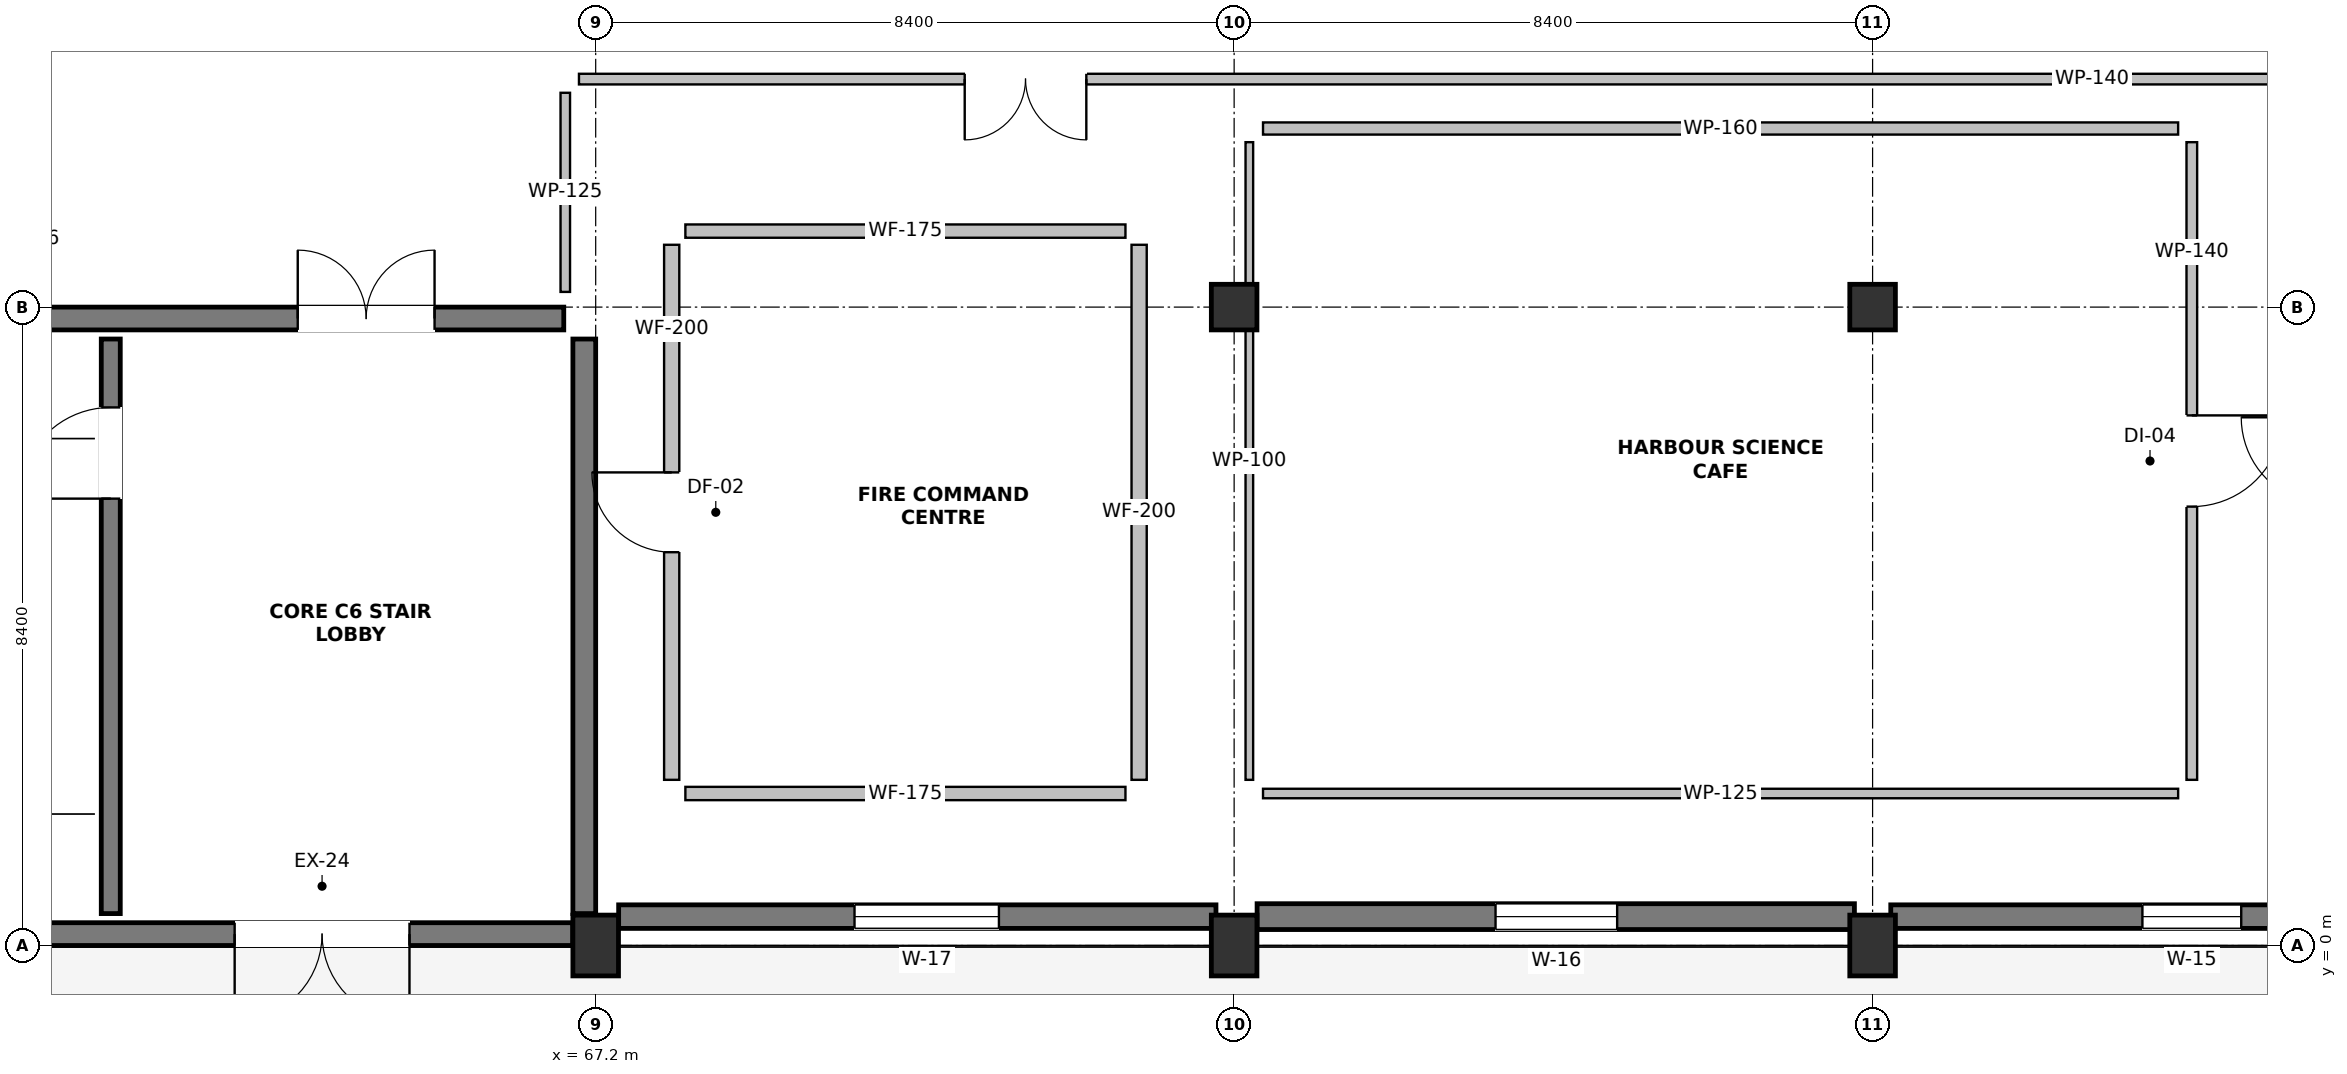
"""IFC4 building model, lengths in metres.
Left out: names, types, materials, properties, quantities, classifications, styles, units other than length and angle.
Written with IfcOpenShell. Run it as: python <this file> out.ifc"""

import sys

from ifc_helpers import new_model, si_unit, direction, frame, frame_2d, origin, origin_2d, place, context, subcontext, project, spatial, rectangle, extrude, element, fill, save


model = new_model("IFC4")
c1 = context("Model", 3, precision=1e-05, world=origin(), true_north=direction((0.0, 1.0)))
c2 = subcontext(c1, "Body", "Model", "MODEL_VIEW")
j1 = project(units=[si_unit("LENGTHUNIT", "METRE"), si_unit("PLANEANGLEUNIT", "RADIAN")], contexts=[c1])
p1 = place(None, origin())
s1 = spatial("IfcSite", under=j1, at=p1, CompositionType="ELEMENT")
p2 = place(p1, origin())
s2 = spatial("IfcBuilding", under=s1, at=p2, CompositionType="ELEMENT")
p3 = place(p2, origin())
s3 = spatial("IfcBuildingStorey", under=s2, at=p3, CompositionType="ELEMENT", Elevation=0.0)
for number, where, z_axis, x_axis in (
    (1, (67.2, 0.0, 0.0), (0.0, 0.0, 1.0), (1.0, 0.0, 0.0)),
    (2, (75.6, 0.0, 0.0), (0.0, 0.0, 1.0), (1.0, 0.0, 0.0)),
    (3, (84.0, 0.0, 0.0), (0.0, 0.0, 1.0), (1.0, 0.0, 0.0)),
):
    element("IfcColumn", number, at=place(p3, frame(where, z_axis=z_axis, x_axis=x_axis)), inside=s3, PredefinedType="COLUMN", context=c2, shape_type="SweptSolid", body=[
        extrude(rectangle(XDim=0.6, YDim=0.8, at=origin_2d()), origin(), (0.0, 0.0, 1.0), 5.1),
    ])
for number, where, z_axis, x_axis in (
    (4, (75.6, 8.4, 0.0), (0.0, 0.0, 1.0), (1.0, 0.0, 0.0)),
    (5, (84.0, 8.4, 0.0), (0.0, 0.0, 1.0), (1.0, 0.0, 0.0)),
):
    element("IfcColumn", number, at=place(p3, frame(where, z_axis=z_axis, x_axis=x_axis)), inside=s3, PredefinedType="COLUMN", context=c2, shape_type="SweptSolid", body=[
        extrude(rectangle(XDim=0.6, YDim=0.6, at=origin_2d()), origin(), (0.0, 0.0, 1.0), 5.1),
    ])
p4 = place(p3, frame((92.161, 0.38, 0.0), z_axis=(0.0, 0.0, 1.0), x_axis=(-1.0, 0.0, 0.0)))
e6 = element("IfcWall", 6, at=p4, inside=s3, PredefinedType="SOLIDWALL", context=c2, shape_type="SweptSolid", body=[
    extrude(rectangle(XDim=7.922, YDim=0.31, at=frame_2d((3.961, 0.0))), origin(), (0.0, 0.0, 1.0), 4.05),
])
p5 = place(p4, frame((3.311, 0.0, 0.85)))
e7 = element("IfcOpeningElement", 7, at=p5, cuts=e6, PredefinedType="OPENING", context=c2, shape_type="SweptSolid", body=[
    extrude(rectangle(XDim=1.3, YDim=1.7, at=frame_2d((0.65, 0.85))), frame((0.0, 0.167, 0.0), z_axis=(0.0, -1.0, 0.0), x_axis=(1.0, 0.0, 0.0)), (0.0, 0.0, 1.0), 0.334),
])
p6 = place(p3, frame((83.761, 0.38, 0.0), z_axis=(0.0, 0.0, 1.0), x_axis=(-1.0, 0.0, 0.0)))
e8 = element("IfcWall", 8, at=p6, inside=s3, PredefinedType="SOLIDWALL", context=c2, shape_type="SweptSolid", body=[
    extrude(rectangle(XDim=7.859, YDim=0.34, at=frame_2d((3.929, 0.0))), origin(), (0.0, 0.0, 1.0), 4.05),
])
p7 = place(p6, frame((3.122, 0.0, 0.85)))
e9 = element("IfcOpeningElement", 9, at=p7, cuts=e8, PredefinedType="OPENING", context=c2, shape_type="SweptSolid", body=[
    extrude(rectangle(XDim=1.6, YDim=1.7, at=frame_2d((0.8, 0.85))), frame((0.0, 0.182, 0.0), z_axis=(0.0, -1.0, 0.0), x_axis=(1.0, 0.0, 0.0)), (0.0, 0.0, 1.0), 0.364),
])
p8 = place(p3, frame((75.361, 0.38, 0.0), z_axis=(0.0, 0.0, 1.0), x_axis=(-1.0, 0.0, 0.0)))
e10 = element("IfcWall", 10, at=p8, inside=s3, PredefinedType="SOLIDWALL", context=c2, shape_type="SweptSolid", body=[
    extrude(rectangle(XDim=7.859, YDim=0.31, at=frame_2d((3.929, 0.0))), origin(), (0.0, 0.0, 1.0), 4.05),
])
p9 = place(p8, frame((2.855, 0.0, 0.85)))
e11 = element("IfcOpeningElement", 11, at=p9, cuts=e10, PredefinedType="OPENING", context=c2, shape_type="SweptSolid", body=[
    extrude(rectangle(XDim=1.9, YDim=1.7, at=frame_2d((0.95, 0.85))), frame((0.0, 0.167, 0.0), z_axis=(0.0, -1.0, 0.0), x_axis=(1.0, 0.0, 0.0)), (0.0, 0.0, 1.0), 0.334),
])
p10 = place(p3, frame((50.702, 0.15, 0.0), z_axis=(0.0, 0.0, 1.0), x_axis=(1.0, 0.0, 0.0)))
e12 = element("IfcWall", 12, at=p10, inside=s3, PredefinedType="SHEAR", context=c2, shape_type="SweptSolid", body=[
    extrude(rectangle(XDim=16.196, YDim=0.3, at=frame_2d((8.098, 0.0))), origin(), (0.0, 0.0, 1.0), 4.7),
])
p11 = place(p10, frame((11.748, 0.0, 0.0)))
e13 = element("IfcOpeningElement", 13, at=p11, cuts=e12, PredefinedType="OPENING", context=c2, shape_type="SweptSolid", body=[
    extrude(rectangle(XDim=2.3, YDim=2.4, at=frame_2d((1.15, 1.2))), frame((0.0, 0.162, 0.0), z_axis=(0.0, -1.0, 0.0), x_axis=(1.0, 0.0, 0.0)), (0.0, 0.0, 1.0), 0.324),
])
p12 = place(p3, frame((50.82, 8.25, 0.0), z_axis=(0.0, 0.0, 1.0), x_axis=(1.0, 0.0, 0.0)))
e14 = element("IfcWall", 14, at=p12, inside=s3, PredefinedType="SHEAR", context=c2, shape_type="SweptSolid", body=[
    extrude(rectangle(XDim=15.96, YDim=0.3, at=frame_2d((7.98, 0.0))), origin(), (0.0, 0.0, 1.0), 4.7),
])
p13 = place(p12, frame((12.46, 0.0, 0.0)))
e15 = element("IfcOpeningElement", 15, at=p13, cuts=e14, PredefinedType="OPENING", context=c2, shape_type="SweptSolid", body=[
    extrude(rectangle(XDim=1.8, YDim=2.2, at=frame_2d((0.9, 1.1))), frame((0.0, 0.162, 0.0), z_axis=(0.0, -1.0, 0.0), x_axis=(1.0, 0.0, 0.0)), (0.0, 0.0, 1.0), 0.324),
])
p14 = place(p3, frame((67.05, 0.42, 0.0), z_axis=(0.0, 0.0, 1.0), x_axis=(0.0, 1.0, 0.0)))
e16 = element("IfcWall", 16, at=p14, inside=s3, PredefinedType="SHEAR", context=c2, shape_type="SweptSolid", body=[
    extrude(rectangle(XDim=7.56, YDim=0.3, at=frame_2d((3.78, 0.0))), origin(), (0.0, 0.0, 1.0), 4.7),
])
p15 = place(p3, frame((60.82, 0.42, 0.0), z_axis=(0.0, 0.0, 1.0), x_axis=(0.0, 1.0, 0.0)))
e17 = element("IfcWall", 17, at=p15, inside=s3, PredefinedType="SHEAR", context=c2, shape_type="SweptSolid", body=[
    extrude(rectangle(XDim=7.56, YDim=0.25, at=frame_2d((3.78, 0.0))), origin(), (0.0, 0.0, 1.0), 4.7),
])
p16 = place(p15, frame((5.46, 0.0, 0.0)))
e18 = element("IfcOpeningElement", 18, at=p16, cuts=e17, PredefinedType="OPENING", context=c2, shape_type="SweptSolid", body=[
    extrude(rectangle(XDim=1.2, YDim=2.2, at=frame_2d((0.6, 1.1))), frame((0.0, 0.137, 0.0), z_axis=(0.0, -1.0, 0.0), x_axis=(1.0, 0.0, 0.0)), (0.0, 0.0, 1.0), 0.274),
])
p17 = place(p3, frame((99.62, 11.4, 0.0), z_axis=(0.0, 0.0, 1.0), x_axis=(-1.0, 0.0, 0.0)))
e19 = element("IfcWall", 19, at=p17, inside=s3, PredefinedType="PARTITIONING", context=c2, shape_type="SweptSolid", body=[
    extrude(rectangle(XDim=32.64, YDim=0.14, at=frame_2d((16.32, 0.0))), origin(), (0.0, 0.0, 1.0), 4.25),
])
p18 = place(p17, frame((25.965, 0.0, 0.0)))
e20 = element("IfcOpeningElement", 20, at=p18, cuts=e19, PredefinedType="OPENING", context=c2, shape_type="SweptSolid", body=[
    extrude(rectangle(XDim=1.6, YDim=2.2, at=frame_2d((0.8, 1.1))), frame((0.0, 0.082, 0.0), z_axis=(0.0, -1.0, 0.0), x_axis=(1.0, 0.0, 0.0)), (0.0, 0.0, 1.0), 0.164),
])
p19 = place(p3, frame((66.8, 11.22, 0.0), z_axis=(0.0, 0.0, 1.0), x_axis=(0.0, -1.0, 0.0)))
e21 = element("IfcWall", 21, at=p19, inside=s3, PredefinedType="PARTITIONING", context=c2, shape_type="SweptSolid", body=[
    extrude(rectangle(XDim=2.62, YDim=0.125, at=frame_2d((1.31, 0.0))), origin(), (0.0, 0.0, 1.0), 4.7),
])
p20 = place(p3, frame((75.98, 10.75, 0.0), z_axis=(0.0, 0.0, 1.0), x_axis=(1.0, 0.0, 0.0)))
e22 = element("IfcWall", 22, at=p20, inside=s3, PredefinedType="PARTITIONING", context=c2, shape_type="SweptSolid", body=[
    extrude(rectangle(XDim=12.04, YDim=0.16, at=frame_2d((6.02, 0.0))), origin(), (0.0, 0.0, 1.0), 4.25),
])
p21 = place(p3, frame((88.2, 10.57, 0.0), z_axis=(0.0, 0.0, 1.0), x_axis=(0.0, -1.0, 0.0)))
e23 = element("IfcWall", 23, at=p21, inside=s3, PredefinedType="PARTITIONING", context=c2, shape_type="SweptSolid", body=[
    extrude(rectangle(XDim=8.39, YDim=0.14, at=frame_2d((4.195, 0.0))), origin(), (0.0, 0.0, 1.0), 4.7),
])
p22 = place(p21, frame((3.595, 0.0, 0.0)))
e24 = element("IfcOpeningElement", 24, at=p22, cuts=e23, PredefinedType="OPENING", context=c2, shape_type="SweptSolid", body=[
    extrude(rectangle(XDim=1.2, YDim=2.2, at=frame_2d((0.6, 1.1))), frame((0.0, 0.082, 0.0), z_axis=(0.0, -1.0, 0.0), x_axis=(1.0, 0.0, 0.0)), (0.0, 0.0, 1.0), 0.164),
])
p23 = place(p3, frame((88.02, 2.0, 0.0), z_axis=(0.0, 0.0, 1.0), x_axis=(-1.0, 0.0, 0.0)))
e25 = element("IfcWall", 25, at=p23, inside=s3, PredefinedType="PARTITIONING", context=c2, shape_type="SweptSolid", body=[
    extrude(rectangle(XDim=12.04, YDim=0.125, at=frame_2d((6.02, 0.0))), origin(), (0.0, 0.0, 1.0), 4.7),
])
p24 = place(p3, frame((75.8, 2.18, 0.0), z_axis=(0.0, 0.0, 1.0), x_axis=(0.0, 1.0, 0.0)))
e26 = element("IfcWall", 26, at=p24, inside=s3, PredefinedType="PARTITIONING", context=c2, shape_type="SweptSolid", body=[
    extrude(rectangle(XDim=8.39, YDim=0.1, at=frame_2d((4.195, 0.0))), origin(), (0.0, 0.0, 1.0), 3.95),
])
p25 = place(p3, frame((68.38, 9.4, 0.0), z_axis=(0.0, 0.0, 1.0), x_axis=(1.0, 0.0, 0.0)))
e27 = element("IfcWall", 27, at=p25, inside=s3, PredefinedType="PARTITIONING", context=c2, shape_type="SweptSolid", body=[
    extrude(rectangle(XDim=5.79, YDim=0.175, at=frame_2d((2.895, 0.0))), origin(), (0.0, 0.0, 1.0), 4.7),
])
p26 = place(p3, frame((74.35, 9.22, 0.0), z_axis=(0.0, 0.0, 1.0), x_axis=(0.0, -1.0, 0.0)))
e28 = element("IfcWall", 28, at=p26, inside=s3, PredefinedType="PARTITIONING", context=c2, shape_type="SweptSolid", body=[
    extrude(rectangle(XDim=7.04, YDim=0.2, at=frame_2d((3.52, 0.0))), origin(), (0.0, 0.0, 1.0), 4.7),
])
p27 = place(p3, frame((74.17, 2.0, 0.0), z_axis=(0.0, 0.0, 1.0), x_axis=(-1.0, 0.0, 0.0)))
e29 = element("IfcWall", 29, at=p27, inside=s3, PredefinedType="PARTITIONING", context=c2, shape_type="SweptSolid", body=[
    extrude(rectangle(XDim=5.79, YDim=0.175, at=frame_2d((2.895, 0.0))), origin(), (0.0, 0.0, 1.0), 4.7),
])
p28 = place(p3, frame((68.2, 2.18, 0.0), z_axis=(0.0, 0.0, 1.0), x_axis=(0.0, 1.0, 0.0)))
e30 = element("IfcWall", 30, at=p28, inside=s3, PredefinedType="PARTITIONING", context=c2, shape_type="SweptSolid", body=[
    extrude(rectangle(XDim=7.04, YDim=0.2, at=frame_2d((3.52, 0.0))), origin(), (0.0, 0.0, 1.0), 4.7),
])
p29 = place(p28, frame((2.995, 0.0, 0.0)))
e31 = element("IfcOpeningElement", 31, at=p29, cuts=e30, PredefinedType="OPENING", context=c2, shape_type="SweptSolid", body=[
    extrude(rectangle(XDim=1.05, YDim=2.15, at=frame_2d((0.525, 1.075))), frame((0.0, 0.112, 0.0), z_axis=(0.0, -1.0, 0.0), x_axis=(1.0, 0.0, 0.0)), (0.0, 0.0, 1.0), 0.224),
])
p30 = place(p5, origin())
e32 = element("IfcWindow", 32, at=p30, inside=s3, PartitioningType="SINGLE_PANEL", PredefinedType="WINDOW", context=c2, shape_type="SweptSolid", body=[
    extrude(rectangle(XDim=1.3, YDim=1.7, at=frame_2d((0.65, 0.85))), frame((0.0, 0.03, 0.0), z_axis=(0.0, -1.0, 0.0), x_axis=(1.0, 0.0, 0.0)), (0.0, 0.0, 1.0), 0.06),
])
fill(e7, e32)
p31 = place(p7, origin())
e33 = element("IfcWindow", 33, at=p31, inside=s3, PartitioningType="SINGLE_PANEL", PredefinedType="WINDOW", context=c2, shape_type="SweptSolid", body=[
    extrude(rectangle(XDim=1.6, YDim=1.7, at=frame_2d((0.8, 0.85))), frame((0.0, 0.03, 0.0), z_axis=(0.0, -1.0, 0.0), x_axis=(1.0, 0.0, 0.0)), (0.0, 0.0, 1.0), 0.06),
])
fill(e9, e33)
p32 = place(p9, origin())
e34 = element("IfcWindow", 34, at=p32, inside=s3, PartitioningType="SINGLE_PANEL", PredefinedType="WINDOW", context=c2, shape_type="SweptSolid", body=[
    extrude(rectangle(XDim=1.9, YDim=1.7, at=frame_2d((0.95, 0.85))), frame((0.0, 0.03, 0.0), z_axis=(0.0, -1.0, 0.0), x_axis=(1.0, 0.0, 0.0)), (0.0, 0.0, 1.0), 0.06),
])
fill(e11, e34)
p33 = place(p11, frame((2.3, 0.0, 0.0), z_axis=(0.0, 0.0, 1.0), x_axis=(-1.0, 0.0, 0.0)))
e35 = element("IfcDoor", 35, at=p33, inside=s3, OperationType="DOUBLE_DOOR_SINGLE_SWING", PredefinedType="DOOR", context=c2, shape_type="SweptSolid", body=[
    extrude(rectangle(XDim=2.3, YDim=2.4, at=frame_2d((1.15, 1.2))), frame((0.0, 0.025, 0.0), z_axis=(0.0, -1.0, 0.0), x_axis=(1.0, 0.0, 0.0)), (0.0, 0.0, 1.0), 0.05),
])
fill(e13, e35)
p34 = place(p13, origin())
e36 = element("IfcDoor", 36, at=p34, inside=s3, OperationType="DOUBLE_DOOR_SINGLE_SWING", PredefinedType="DOOR", context=c2, shape_type="SweptSolid", body=[
    extrude(rectangle(XDim=1.8, YDim=2.2, at=frame_2d((0.9, 1.1))), frame((0.0, 0.025, 0.0), z_axis=(0.0, -1.0, 0.0), x_axis=(1.0, 0.0, 0.0)), (0.0, 0.0, 1.0), 0.05),
])
fill(e15, e36)
p35 = place(p16, origin())
e37 = element("IfcDoor", 37, at=p35, inside=s3, OperationType="SINGLE_SWING_LEFT", PredefinedType="DOOR", context=c2, shape_type="SweptSolid", body=[
    extrude(rectangle(XDim=1.2, YDim=2.2, at=frame_2d((0.6, 1.1))), frame((0.0, 0.025, 0.0), z_axis=(0.0, -1.0, 0.0), x_axis=(1.0, 0.0, 0.0)), (0.0, 0.0, 1.0), 0.05),
])
fill(e18, e37)
p36 = place(p18, origin())
e38 = element("IfcDoor", 38, at=p36, inside=s3, OperationType="DOUBLE_DOOR_SINGLE_SWING", PredefinedType="DOOR", context=c2, shape_type="SweptSolid", body=[
    extrude(rectangle(XDim=1.6, YDim=2.2, at=frame_2d((0.8, 1.1))), frame((0.0, 0.025, 0.0), z_axis=(0.0, -1.0, 0.0), x_axis=(1.0, 0.0, 0.0)), (0.0, 0.0, 1.0), 0.05),
])
fill(e20, e38)
p37 = place(p22, origin())
e39 = element("IfcDoor", 39, at=p37, inside=s3, OperationType="SINGLE_SWING_LEFT", PredefinedType="DOOR", context=c2, shape_type="SweptSolid", body=[
    extrude(rectangle(XDim=1.2, YDim=2.2, at=frame_2d((0.6, 1.1))), frame((0.0, 0.025, 0.0), z_axis=(0.0, -1.0, 0.0), x_axis=(1.0, 0.0, 0.0)), (0.0, 0.0, 1.0), 0.05),
])
fill(e24, e39)
p38 = place(p29, origin())
e40 = element("IfcDoor", 40, at=p38, inside=s3, OperationType="SINGLE_SWING_RIGHT", PredefinedType="DOOR", context=c2, shape_type="SweptSolid", body=[
    extrude(rectangle(XDim=1.05, YDim=2.15, at=frame_2d((0.525, 1.075))), frame((0.0, 0.025, 0.0), z_axis=(0.0, -1.0, 0.0), x_axis=(1.0, 0.0, 0.0)), (0.0, 0.0, 1.0), 0.05),
])
fill(e31, e40)
save(model, sys.argv[1])
